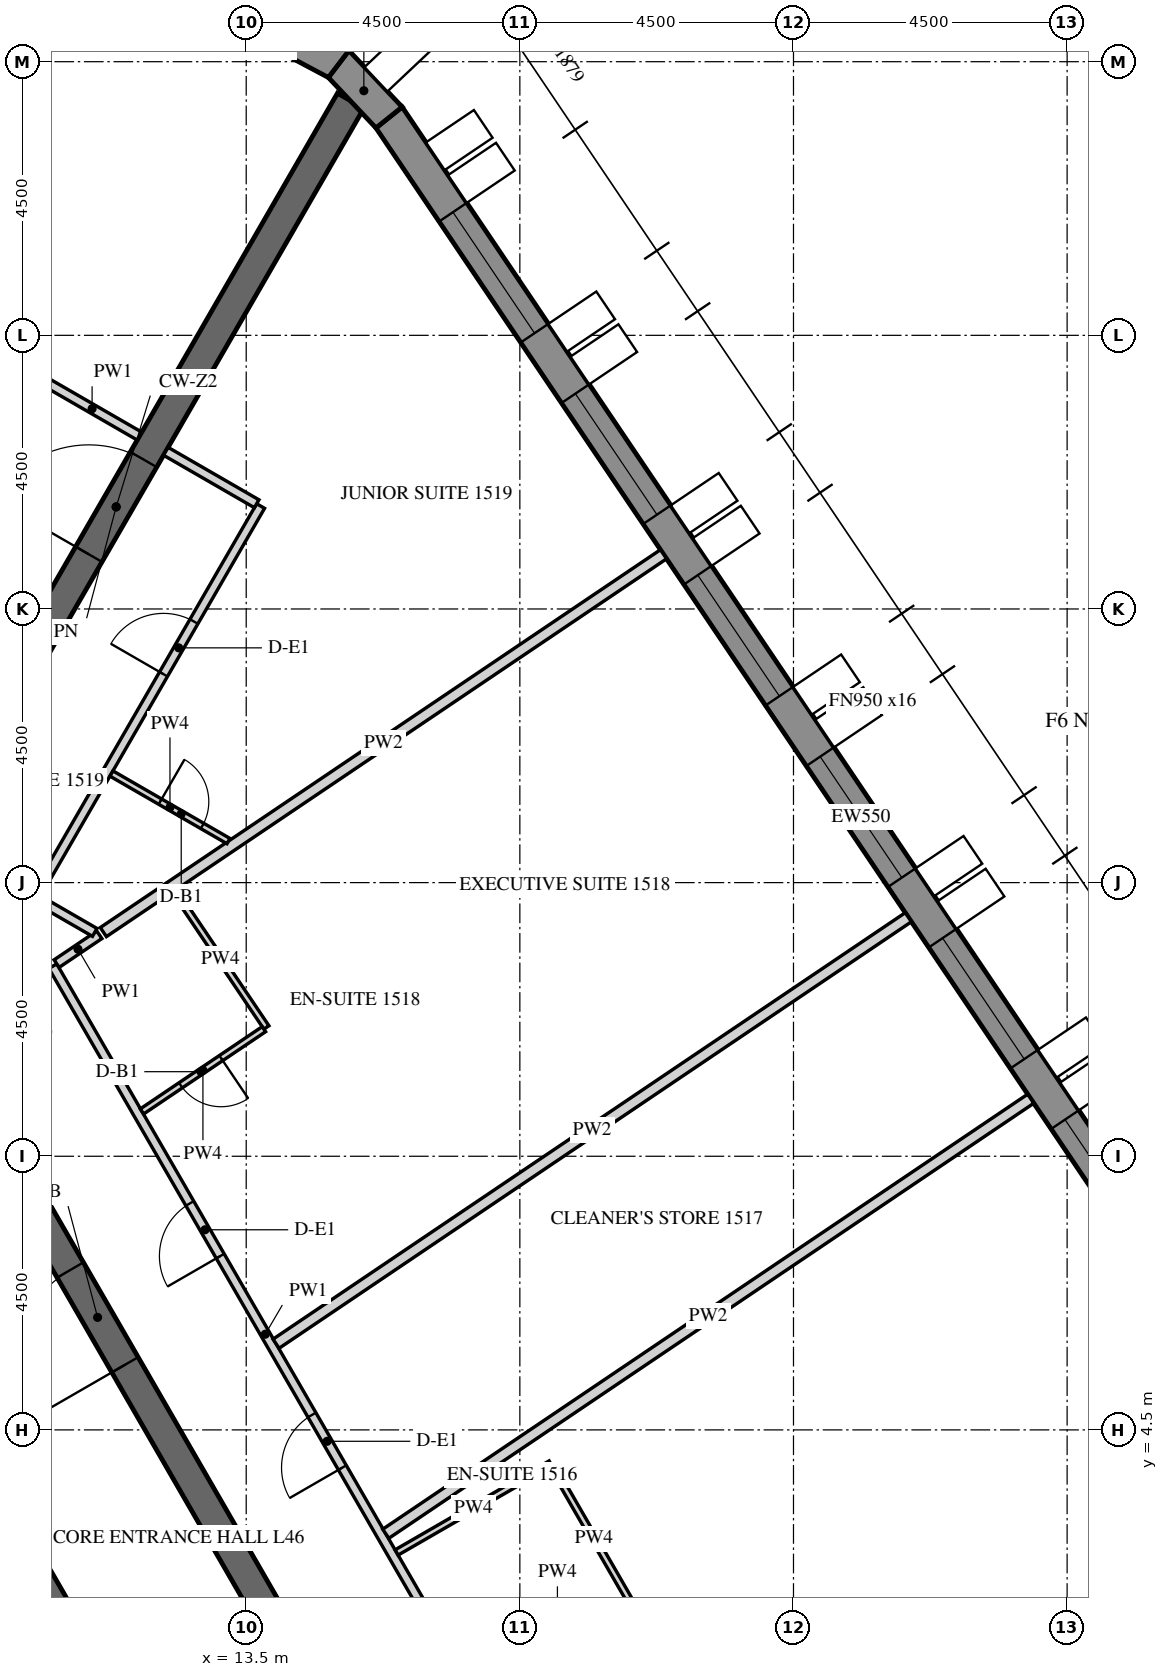
"""IFC4 building model, lengths in metres.
Left out: names, types, materials, properties, quantities, classifications, styles, units other than length and angle.
Written with IfcOpenShell. Run it as: python <this file> out.ifc"""

import sys

from ifc_helpers import new_model, si_unit, direction, frame, frame_2d, origin, place, context, subcontext, project, spatial, polyline, rectangle, outline, extrude, element, fill, save


model = new_model("IFC4")
c1 = context("Model", 3, precision=1e-05, world=origin(), true_north=direction((0.0, 1.0)))
c2 = subcontext(c1, "Body", "Model", "MODEL_VIEW")
j1 = project(units=[si_unit("LENGTHUNIT", "METRE"), si_unit("PLANEANGLEUNIT", "RADIAN")], contexts=[c1])
p1 = place(None, origin())
s1 = spatial("IfcSite", under=j1, at=p1, CompositionType="ELEMENT")
p2 = place(p1, origin())
s2 = spatial("IfcBuilding", under=s1, at=p2, CompositionType="ELEMENT")
p3 = place(p2, frame((0.0, 0.0, 195.6)))
s3 = spatial("IfcBuildingStorey", under=s2, at=p3, CompositionType="ELEMENT", Elevation=195.6)
p4 = place(p3, frame((31.371, 3.071, -0.15), z_axis=(0.0, 0.0, 1.0), x_axis=(-0.559189891278, 0.829039604297, 0.0)))
e1 = element("IfcWall", 1, at=p4, inside=s3, PredefinedType="SOLIDWALL", context=c2, shape_type="SweptSolid", body=[
    extrude(outline(polyline([(-0.026, -0.275), (27.781, -0.275), (27.736, 0.275), (0.026, 0.275), (-0.026, -0.275)])), origin(), (0.0, 0.0, 1.0), 3.9),
])
p5 = place(p4, frame((1.879, 0.0, 1.05)))
e2 = element("IfcOpeningElement", 2, at=p5, cuts=e1, PredefinedType="OPENING", context=c2, shape_type="SweptSolid", body=[
    extrude(rectangle(XDim=2.4, YDim=2.4, at=frame_2d((1.2, 1.2))), frame((0.0, 0.285, 0.0), z_axis=(0.0, -1.0, 0.0), x_axis=(1.0, 0.0, 0.0)), (0.0, 0.0, 1.0), 0.57),
])
p6 = place(p4, frame((5.479, 0.0, 1.05)))
e3 = element("IfcOpeningElement", 3, at=p6, cuts=e1, PredefinedType="OPENING", context=c2, shape_type="SweptSolid", body=[
    extrude(rectangle(XDim=2.4, YDim=2.4, at=frame_2d((1.2, 1.2))), frame((0.0, 0.285, 0.0), z_axis=(0.0, -1.0, 0.0), x_axis=(1.0, 0.0, 0.0)), (0.0, 0.0, 1.0), 0.57),
])
p7 = place(p4, frame((9.079, 0.0, 1.05)))
e4 = element("IfcOpeningElement", 4, at=p7, cuts=e1, PredefinedType="OPENING", context=c2, shape_type="SweptSolid", body=[
    extrude(rectangle(XDim=2.4, YDim=2.4, at=frame_2d((1.2, 1.2))), frame((0.0, 0.285, 0.0), z_axis=(0.0, -1.0, 0.0), x_axis=(1.0, 0.0, 0.0)), (0.0, 0.0, 1.0), 0.57),
])
p8 = place(p4, frame((12.679, 0.0, 1.05)))
e5 = element("IfcOpeningElement", 5, at=p8, cuts=e1, PredefinedType="OPENING", context=c2, shape_type="SweptSolid", body=[
    extrude(rectangle(XDim=2.4, YDim=2.4, at=frame_2d((1.2, 1.2))), frame((0.0, 0.285, 0.0), z_axis=(0.0, -1.0, 0.0), x_axis=(1.0, 0.0, 0.0)), (0.0, 0.0, 1.0), 0.57),
])
p9 = place(p4, frame((16.279, 0.0, 1.05)))
e6 = element("IfcOpeningElement", 6, at=p9, cuts=e1, PredefinedType="OPENING", context=c2, shape_type="SweptSolid", body=[
    extrude(rectangle(XDim=2.4, YDim=2.4, at=frame_2d((1.2, 1.2))), frame((0.0, 0.285, 0.0), z_axis=(0.0, -1.0, 0.0), x_axis=(1.0, 0.0, 0.0)), (0.0, 0.0, 1.0), 0.57),
])
p10 = place(p4, frame((19.879, 0.0, 1.05)))
e7 = element("IfcOpeningElement", 7, at=p10, cuts=e1, PredefinedType="OPENING", context=c2, shape_type="SweptSolid", body=[
    extrude(rectangle(XDim=2.4, YDim=2.4, at=frame_2d((1.2, 1.2))), frame((0.0, 0.285, 0.0), z_axis=(0.0, -1.0, 0.0), x_axis=(1.0, 0.0, 0.0)), (0.0, 0.0, 1.0), 0.57),
])
p11 = place(p4, frame((23.479, 0.0, 1.05)))
e8 = element("IfcOpeningElement", 8, at=p11, cuts=e1, PredefinedType="OPENING", context=c2, shape_type="SweptSolid", body=[
    extrude(rectangle(XDim=2.4, YDim=2.4, at=frame_2d((1.2, 1.2))), frame((0.0, 0.285, 0.0), z_axis=(0.0, -1.0, 0.0), x_axis=(1.0, 0.0, 0.0)), (0.0, 0.0, 1.0), 0.57),
])
p12 = place(p3, frame((15.849, 26.083, -0.15), z_axis=(0.0, 0.0, 1.0), x_axis=(-0.686196220404, 0.727416488061, 0.0)))
e9 = element("IfcWall", 9, at=p12, inside=s3, PredefinedType="SOLIDWALL", context=c2, shape_type="SweptSolid", body=[
    extrude(outline(polyline([(-0.022, -0.275), (1.253, -0.275), (1.163, 0.275), (0.022, 0.275), (-0.022, -0.275)])), origin(), (0.0, 0.0, 1.0), 3.9),
])
p13 = place(p3, frame((15.02, 26.962, -0.15), z_axis=(0.0, 0.0, 1.0), x_axis=(-0.882950818639, 0.469465495926, 0.0)))
e10 = element("IfcWall", 10, at=p13, inside=s3, PredefinedType="SOLIDWALL", context=c2, shape_type="SweptSolid", body=[
    extrude(outline(polyline([(-0.045, -0.275), (1.253, -0.275), (1.163, 0.275), (0.045, 0.275), (-0.045, -0.275)])), origin(), (0.0, 0.0, 1.0), 3.9),
])
p14 = place(p3, frame((14.722, 0.0, -0.15), z_axis=(0.0, 0.0, 1.0), x_axis=(-0.50000571537, 0.866022103989, 0.0)))
e11 = element("IfcWall", 11, at=p14, inside=s3, PredefinedType="SHEAR", context=c2, shape_type="SweptSolid", body=[
    extrude(outline(polyline([(-0.144, -0.25), (14.867, -0.25), (14.578, 0.25), (0.144, 0.25), (-0.144, -0.25)])), origin(), (0.0, 0.0, 1.0), 3.9),
])
p15 = place(p14, frame((6.432, 0.0, 0.15)))
e12 = element("IfcOpeningElement", 12, at=p15, cuts=e11, PredefinedType="OPENING", context=c2, shape_type="SweptSolid", body=[
    extrude(rectangle(XDim=1.8, YDim=2.4, at=frame_2d((0.9, 1.2))), frame((0.0, 0.26, 0.0), z_axis=(0.0, -1.0, 0.0), x_axis=(1.0, 0.0, 0.0)), (0.0, 0.0, 1.0), 0.52),
])
p16 = place(p3, frame((7.506, 13.0, -0.15), z_axis=(0.0, 0.0, 1.0), x_axis=(0.499988271576, 0.866032175087, 0.0)))
e13 = element("IfcWall", 13, at=p16, inside=s3, PredefinedType="SHEAR", context=c2, shape_type="SweptSolid", body=[
    extrude(rectangle(XDim=15.424, YDim=0.5, at=frame_2d((7.712, 0.0))), origin(), (0.0, 0.0, 1.0), 3.9),
])
p17 = place(p16, frame((6.812, 0.0, 0.15)))
e14 = element("IfcOpeningElement", 14, at=p17, cuts=e13, PredefinedType="OPENING", context=c2, shape_type="SweptSolid", body=[
    extrude(rectangle(XDim=1.8, YDim=2.4, at=frame_2d((0.9, 1.2))), frame((0.0, 0.26, 0.0), z_axis=(0.0, -1.0, 0.0), x_axis=(1.0, 0.0, 0.0)), (0.0, 0.0, 1.0), 0.52),
])
p18 = place(p3, frame((11.345, 0.0, -0.15), z_axis=(0.0, 0.0, 1.0), x_axis=(-0.499995046907, 0.866028263435, 0.0)))
e15 = element("IfcWall", 15, at=p18, inside=s3, PredefinedType="SHEAR", context=c2, shape_type="SweptSolid", body=[
    extrude(outline(polyline([(-0.101, -0.175), (11.446, -0.175), (11.244, 0.175), (0.101, 0.175), (-0.101, -0.175)])), origin(), (0.0, 0.0, 1.0), 3.9),
])
p19 = place(p18, frame((4.744, 0.0, 0.15)))
e16 = element("IfcOpeningElement", 16, at=p19, cuts=e15, PredefinedType="OPENING", context=c2, shape_type="SweptSolid", body=[
    extrude(rectangle(XDim=1.8, YDim=2.4, at=frame_2d((0.9, 1.2))), frame((0.0, 0.185, 0.0), z_axis=(0.0, -1.0, 0.0), x_axis=(1.0, 0.0, 0.0)), (0.0, 0.0, 1.0), 0.37),
])
p20 = place(p3, frame((11.745, 20.843, 0.0), z_axis=(0.0, 0.0, 1.0), x_axis=(-0.865989075817, 0.500062916607, 0.0)))
e17 = element("IfcWall", 17, at=p20, inside=s3, PredefinedType="PARTITIONING", context=c2, shape_type="SweptSolid", body=[
    extrude(rectangle(XDim=1.8, YDim=0.15, at=frame_2d((0.9, 0.0))), origin(), (0.0, 0.0, 1.0), 2.988),
])
p21 = place(p3, frame((17.308, 0.022, 0.0), z_axis=(0.0, 0.0, 1.0), x_axis=(-0.500009245501, 0.866020065826, 0.0)))
e18 = element("IfcWall", 18, at=p21, inside=s3, PredefinedType="PARTITIONING", context=c2, shape_type="SweptSolid", body=[
    extrude(rectangle(XDim=13.976, YDim=0.15, at=frame_2d((6.988, 0.0))), origin(), (0.0, 0.0, 1.0), 2.988),
])
p22 = place(p21, frame((4.454, 0.0, 0.0)))
e19 = element("IfcOpeningElement", 19, at=p22, cuts=e18, PredefinedType="OPENING", context=c2, shape_type="SweptSolid", body=[
    extrude(rectangle(XDim=1.0, YDim=2.1, at=frame_2d((0.5, 1.05))), frame((0.0, 0.085, 0.0), z_axis=(0.0, -1.0, 0.0), x_axis=(1.0, 0.0, 0.0)), (0.0, 0.0, 1.0), 0.17),
])
p23 = place(p21, frame((8.471, 0.0, 0.0)))
e20 = element("IfcOpeningElement", 20, at=p23, cuts=e18, PredefinedType="OPENING", context=c2, shape_type="SweptSolid", body=[
    extrude(rectangle(XDim=1.0, YDim=2.1, at=frame_2d((0.5, 1.05))), frame((0.0, 0.085, 0.0), z_axis=(0.0, -1.0, 0.0), x_axis=(1.0, 0.0, 0.0)), (0.0, 0.0, 1.0), 0.17),
])
p24 = place(p3, frame((10.382, 12.168, 0.0), z_axis=(0.0, 0.0, 1.0), x_axis=(0.828935479655, 0.559344232623, 0.0)))
e21 = element("IfcWall", 21, at=p24, inside=s3, PredefinedType="PARTITIONING", context=c2, shape_type="SweptSolid", body=[
    extrude(rectangle(XDim=0.848, YDim=0.15, at=frame_2d((0.424, 0.0))), origin(), (0.0, 0.0, 1.0), 2.988),
])
p25 = place(p3, frame((10.056, 13.318, 0.0), z_axis=(0.0, 0.0, 1.0), x_axis=(0.499995202058, 0.86602817386, 0.0)))
e22 = element("IfcWall", 22, at=p25, inside=s3, PredefinedType="PARTITIONING", context=c2, shape_type="SweptSolid", body=[
    extrude(rectangle(XDim=7.361, YDim=0.15, at=frame_2d((3.68, 0.0))), origin(), (0.0, 0.0, 1.0), 2.988),
])
p26 = place(p25, frame((4.168, 0.0, 0.0)))
e23 = element("IfcOpeningElement", 23, at=p26, cuts=e22, PredefinedType="OPENING", context=c2, shape_type="SweptSolid", body=[
    extrude(rectangle(XDim=1.0, YDim=2.1, at=frame_2d((0.5, 1.05))), frame((0.0, 0.085, 0.0), z_axis=(0.0, -1.0, 0.0), x_axis=(1.0, 0.0, 0.0)), (0.0, 0.0, 1.0), 0.17),
])
p27 = place(p3, frame((13.672, 19.73, 0.0), z_axis=(0.0, 0.0, 1.0), x_axis=(-0.866074815912, 0.499914405916, 0.0)))
e24 = element("IfcWall", 24, at=p27, inside=s3, PredefinedType="PARTITIONING", context=c2, shape_type="SweptSolid", body=[
    extrude(rectangle(XDim=1.725, YDim=0.15, at=frame_2d((0.862, 0.0))), origin(), (0.0, 0.0, 1.0), 2.988),
])
p28 = place(p3, frame((11.009, 12.681, 0.0), z_axis=(0.0, 0.0, 1.0), x_axis=(-0.86605406138, 0.499950360304, 0.0)))
e25 = element("IfcWall", 25, at=p28, inside=s3, PredefinedType="PARTITIONING", context=c2, shape_type="SweptSolid", body=[
    extrude(rectangle(XDim=1.144, YDim=0.15, at=frame_2d((0.572, 0.0))), origin(), (0.0, 0.0, 1.0), 2.988),
])
p29 = place(p3, frame((15.973, 2.484, 0.0), z_axis=(0.0, 0.0, 1.0), x_axis=(0.866025730634, 0.499999433879, 0.0)))
e26 = element("IfcWall", 26, at=p29, inside=s3, PredefinedType="PARTITIONING", context=c2, shape_type="SweptSolid", body=[
    extrude(rectangle(XDim=2.925, YDim=0.1, at=frame_2d((1.462, 0.0))), origin(), (0.0, 0.0, 1.0), 2.988),
])
p30 = place(p3, frame((18.531, 3.904, 0.0), z_axis=(0.0, 0.0, 1.0), x_axis=(0.499996545922, -0.866027397988, 0.0)))
e27 = element("IfcWall", 27, at=p30, inside=s3, PredefinedType="PARTITIONING", context=c2, shape_type="SweptSolid", body=[
    extrude(rectangle(XDim=2.75, YDim=0.1, at=frame_2d((1.375, 0.0))), origin(), (0.0, 0.0, 1.0), 2.988),
])
p31 = place(p3, frame((26.402, 9.946, 0.0), z_axis=(0.0, 0.0, 1.0), x_axis=(-0.829037771727, -0.559192608187, 0.0)))
e28 = element("IfcWall", 28, at=p31, inside=s3, PredefinedType="PARTITIONING", context=c2, shape_type="SweptSolid", body=[
    extrude(rectangle(XDim=12.794, YDim=0.18, at=frame_2d((6.397, 0.0))), origin(), (0.0, 0.0, 1.0), 2.988),
])
p32 = place(p3, frame((24.389, 12.931, 0.0), z_axis=(0.0, 0.0, 1.0), x_axis=(-0.829040439793, -0.559188652593, 0.0)))
e29 = element("IfcWall", 29, at=p32, inside=s3, PredefinedType="PARTITIONING", context=c2, shape_type="SweptSolid", body=[
    extrude(rectangle(XDim=12.542, YDim=0.18, at=frame_2d((6.271, 0.0))), origin(), (0.0, 0.0, 1.0), 2.988),
])
p33 = place(p3, frame((12.317, 13.364, 0.0), z_axis=(0.0, 0.0, 1.0), x_axis=(0.559203592691, -0.829030362485, 0.0)))
e30 = element("IfcWall", 30, at=p33, inside=s3, PredefinedType="PARTITIONING", context=c2, shape_type="SweptSolid", body=[
    extrude(rectangle(XDim=2.71, YDim=0.1, at=frame_2d((1.355, 0.0))), origin(), (0.0, 0.0, 1.0), 2.988),
])
p34 = place(p3, frame((13.791, 11.09, 0.0), z_axis=(0.0, 0.0, 1.0), x_axis=(-0.829056894888, -0.559164255866, 0.0)))
e31 = element("IfcWall", 31, at=p34, inside=s3, PredefinedType="PARTITIONING", context=c2, shape_type="SweptSolid", body=[
    extrude(rectangle(XDim=2.419, YDim=0.1, at=frame_2d((1.209, 0.0))), origin(), (0.0, 0.0, 1.0), 2.988),
])
p35 = place(p34, frame((0.85, 0.0, 0.0)))
e32 = element("IfcOpeningElement", 32, at=p35, cuts=e31, PredefinedType="OPENING", context=c2, shape_type="SweptSolid", body=[
    extrude(rectangle(XDim=0.8, YDim=2.1, at=frame_2d((0.4, 1.05))), frame((0.0, 0.06, 0.0), z_axis=(0.0, -1.0, 0.0), x_axis=(1.0, 0.0, 0.0)), (0.0, 0.0, 1.0), 0.12),
])
p36 = place(p3, frame((20.363, 18.9, 0.0), z_axis=(0.0, 0.0, 1.0), x_axis=(-0.82903304346, -0.559199618072, 0.0)))
e33 = element("IfcWall", 33, at=p36, inside=s3, PredefinedType="PARTITIONING", context=c2, shape_type="SweptSolid", body=[
    extrude(rectangle(XDim=11.112, YDim=0.18, at=frame_2d((5.556, 0.0))), origin(), (0.0, 0.0, 1.0), 2.988),
])
p37 = place(p3, frame((11.284, 15.294, 0.0), z_axis=(0.0, 0.0, 1.0), x_axis=(0.866017295027, -0.500014044516, 0.0)))
e34 = element("IfcWall", 34, at=p37, inside=s3, PredefinedType="PARTITIONING", context=c2, shape_type="SweptSolid", body=[
    extrude(rectangle(XDim=2.223, YDim=0.1, at=frame_2d((1.111, 0.0))), origin(), (0.0, 0.0, 1.0), 2.988),
])
p38 = place(p37, frame((0.925, 0.0, 0.0)))
e35 = element("IfcOpeningElement", 35, at=p38, cuts=e34, PredefinedType="OPENING", context=c2, shape_type="SweptSolid", body=[
    extrude(rectangle(XDim=0.8, YDim=2.1, at=frame_2d((0.4, 1.05))), frame((0.0, 0.06, 0.0), z_axis=(0.0, -1.0, 0.0), x_axis=(1.0, 0.0, 0.0)), (0.0, 0.0, 1.0), 0.12),
])
p39 = place(p6, frame((0.0, 0.205, 0.0)))
e36 = element("IfcWindow", 36, at=p39, inside=s3, PartitioningType="DOUBLE_PANEL_VERTICAL", PredefinedType="WINDOW", context=c2, shape_type="SweptSolid", body=[
    extrude(rectangle(XDim=2.4, YDim=2.4, at=frame_2d((1.2, 1.2))), frame((0.0, 0.03, 0.0), z_axis=(0.0, -1.0, 0.0), x_axis=(1.0, 0.0, 0.0)), (0.0, 0.0, 1.0), 0.06),
])
fill(e3, e36)
p40 = place(p7, frame((0.0, 0.205, 0.0)))
e37 = element("IfcWindow", 37, at=p40, inside=s3, PartitioningType="DOUBLE_PANEL_VERTICAL", PredefinedType="WINDOW", context=c2, shape_type="SweptSolid", body=[
    extrude(rectangle(XDim=2.4, YDim=2.4, at=frame_2d((1.2, 1.2))), frame((0.0, 0.03, 0.0), z_axis=(0.0, -1.0, 0.0), x_axis=(1.0, 0.0, 0.0)), (0.0, 0.0, 1.0), 0.06),
])
fill(e4, e37)
p41 = place(p8, frame((0.0, 0.205, 0.0)))
e38 = element("IfcWindow", 38, at=p41, inside=s3, PartitioningType="DOUBLE_PANEL_VERTICAL", PredefinedType="WINDOW", context=c2, shape_type="SweptSolid", body=[
    extrude(rectangle(XDim=2.4, YDim=2.4, at=frame_2d((1.2, 1.2))), frame((0.0, 0.03, 0.0), z_axis=(0.0, -1.0, 0.0), x_axis=(1.0, 0.0, 0.0)), (0.0, 0.0, 1.0), 0.06),
])
fill(e5, e38)
p42 = place(p9, frame((0.0, 0.205, 0.0)))
e39 = element("IfcWindow", 39, at=p42, inside=s3, PartitioningType="DOUBLE_PANEL_VERTICAL", PredefinedType="WINDOW", context=c2, shape_type="SweptSolid", body=[
    extrude(rectangle(XDim=2.4, YDim=2.4, at=frame_2d((1.2, 1.2))), frame((0.0, 0.03, 0.0), z_axis=(0.0, -1.0, 0.0), x_axis=(1.0, 0.0, 0.0)), (0.0, 0.0, 1.0), 0.06),
])
fill(e6, e39)
p43 = place(p10, frame((0.0, 0.205, 0.0)))
e40 = element("IfcWindow", 40, at=p43, inside=s3, PartitioningType="DOUBLE_PANEL_VERTICAL", PredefinedType="WINDOW", context=c2, shape_type="SweptSolid", body=[
    extrude(rectangle(XDim=2.4, YDim=2.4, at=frame_2d((1.2, 1.2))), frame((0.0, 0.03, 0.0), z_axis=(0.0, -1.0, 0.0), x_axis=(1.0, 0.0, 0.0)), (0.0, 0.0, 1.0), 0.06),
])
fill(e7, e40)
p44 = place(p11, frame((0.0, 0.205, 0.0)))
e41 = element("IfcWindow", 41, at=p44, inside=s3, PartitioningType="DOUBLE_PANEL_VERTICAL", PredefinedType="WINDOW", context=c2, shape_type="SweptSolid", body=[
    extrude(rectangle(XDim=2.4, YDim=2.4, at=frame_2d((1.2, 1.2))), frame((0.0, 0.03, 0.0), z_axis=(0.0, -1.0, 0.0), x_axis=(1.0, 0.0, 0.0)), (0.0, 0.0, 1.0), 0.06),
])
fill(e8, e41)
p45 = place(p15, origin())
e42 = element("IfcDoor", 42, at=p45, inside=s3, OperationType="DOUBLE_DOOR_SINGLE_SWING", PredefinedType="DOOR", context=c2, shape_type="SweptSolid", body=[
    extrude(rectangle(XDim=1.8, YDim=2.4, at=frame_2d((0.9, 1.2))), frame((0.0, 0.025, 0.0), z_axis=(0.0, -1.0, 0.0), x_axis=(1.0, 0.0, 0.0)), (0.0, 0.0, 1.0), 0.05),
])
fill(e12, e42)
p46 = place(p17, origin())
e43 = element("IfcDoor", 43, at=p46, inside=s3, OperationType="DOUBLE_DOOR_SINGLE_SWING", PredefinedType="DOOR", context=c2, shape_type="SweptSolid", body=[
    extrude(rectangle(XDim=1.8, YDim=2.4, at=frame_2d((0.9, 1.2))), frame((0.0, 0.025, 0.0), z_axis=(0.0, -1.0, 0.0), x_axis=(1.0, 0.0, 0.0)), (0.0, 0.0, 1.0), 0.05),
])
fill(e14, e43)
p47 = place(p22, origin())
e44 = element("IfcDoor", 44, at=p47, inside=s3, OperationType="SINGLE_SWING_LEFT", PredefinedType="DOOR", context=c2, shape_type="SweptSolid", body=[
    extrude(rectangle(XDim=1.0, YDim=2.1, at=frame_2d((0.5, 1.05))), frame((0.0, 0.025, 0.0), z_axis=(0.0, -1.0, 0.0), x_axis=(1.0, 0.0, 0.0)), (0.0, 0.0, 1.0), 0.05),
])
fill(e19, e44)
p48 = place(p23, origin())
e45 = element("IfcDoor", 45, at=p48, inside=s3, OperationType="SINGLE_SWING_RIGHT", PredefinedType="DOOR", context=c2, shape_type="SweptSolid", body=[
    extrude(rectangle(XDim=1.0, YDim=2.1, at=frame_2d((0.5, 1.05))), frame((0.0, 0.025, 0.0), z_axis=(0.0, -1.0, 0.0), x_axis=(1.0, 0.0, 0.0)), (0.0, 0.0, 1.0), 0.05),
])
fill(e20, e45)
p49 = place(p35, origin())
e46 = element("IfcDoor", 46, at=p49, inside=s3, OperationType="SINGLE_SWING_LEFT", PredefinedType="DOOR", context=c2, shape_type="SweptSolid", body=[
    extrude(rectangle(XDim=0.8, YDim=2.1, at=frame_2d((0.4, 1.05))), frame((0.0, 0.025, 0.0), z_axis=(0.0, -1.0, 0.0), x_axis=(1.0, 0.0, 0.0)), (0.0, 0.0, 1.0), 0.05),
])
fill(e32, e46)
p50 = place(p26, origin())
e47 = element("IfcDoor", 47, at=p50, inside=s3, OperationType="SINGLE_SWING_RIGHT", PredefinedType="DOOR", context=c2, shape_type="SweptSolid", body=[
    extrude(rectangle(XDim=1.0, YDim=2.1, at=frame_2d((0.5, 1.05))), frame((0.0, 0.025, 0.0), z_axis=(0.0, -1.0, 0.0), x_axis=(1.0, 0.0, 0.0)), (0.0, 0.0, 1.0), 0.05),
])
fill(e23, e47)
p51 = place(p38, origin())
e48 = element("IfcDoor", 48, at=p51, inside=s3, OperationType="SINGLE_SWING_LEFT", PredefinedType="DOOR", context=c2, shape_type="SweptSolid", body=[
    extrude(rectangle(XDim=0.8, YDim=2.1, at=frame_2d((0.4, 1.05))), frame((0.0, 0.025, 0.0), z_axis=(0.0, -1.0, 0.0), x_axis=(1.0, 0.0, 0.0)), (0.0, 0.0, 1.0), 0.05),
])
fill(e35, e48)
save(model, sys.argv[1])
